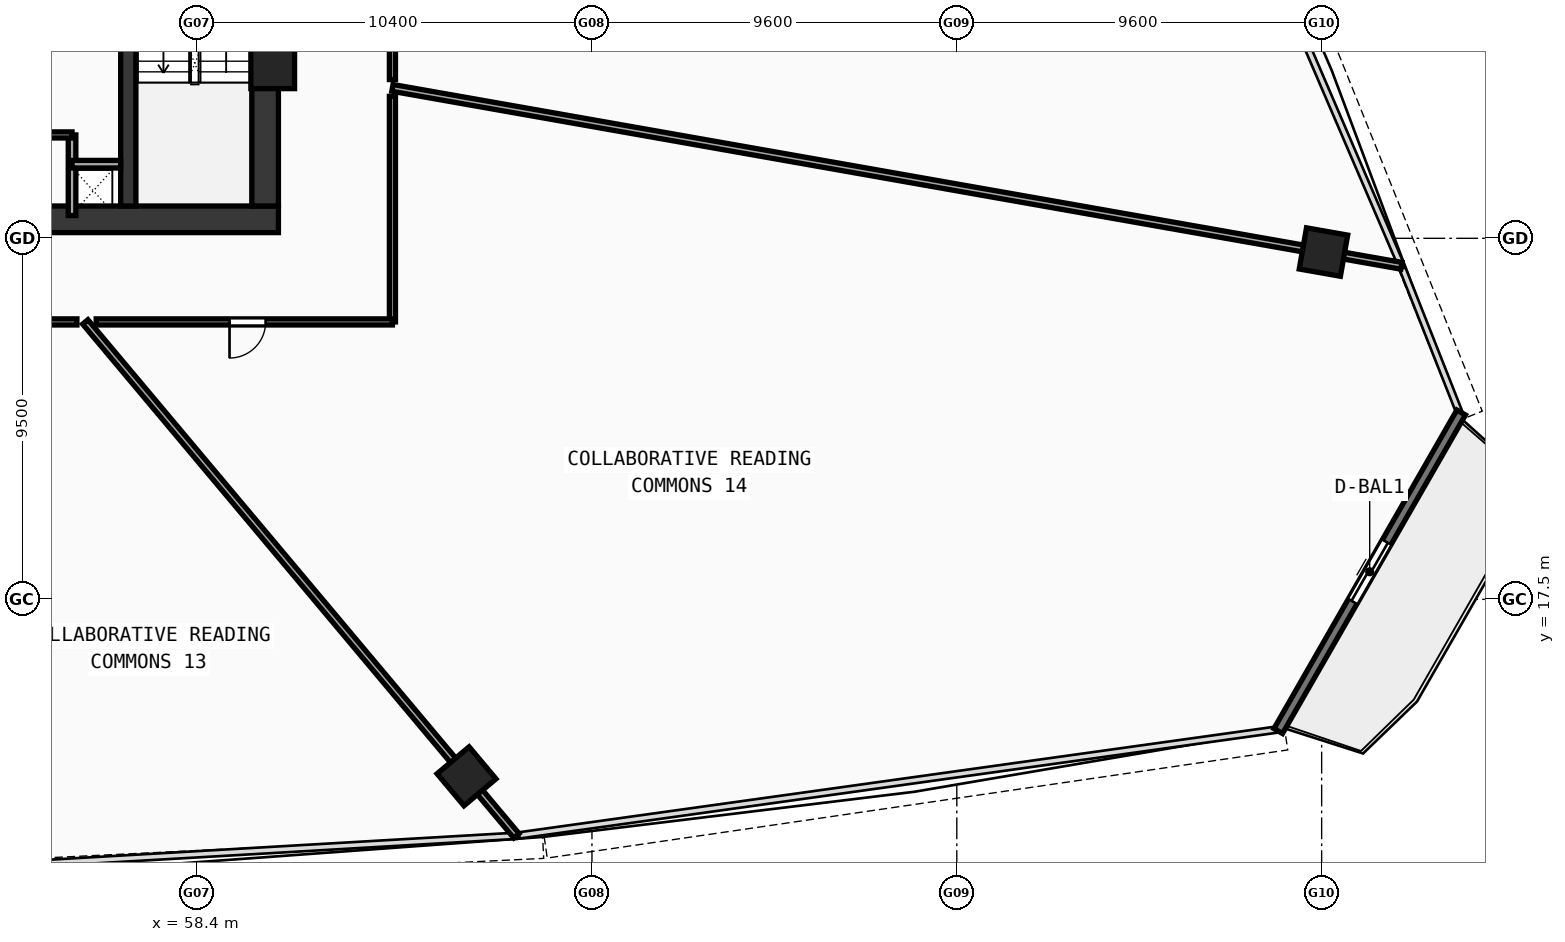
"""IFC4 building model, lengths in metres.
Left out: names, types, materials, properties, quantities, classifications, styles, units other than length and angle.
Written with IfcOpenShell. Run it as: python <this file> out.ifc"""

import sys

from ifc_helpers import new_model, si_unit, direction, frame, frame_2d, origin, origin_with_axes, origin_2d, place, context, subcontext, project, spatial, rectangle, hollow_rectangle, extrude, source, transform, mapped, element, fill, save


model = new_model("IFC4")
c1 = context("Model", 3, precision=1e-05, world=origin(), true_north=direction((0.0, 1.0)))
c2 = subcontext(c1, "Body", "Model", "MODEL_VIEW")
j1 = project(units=[si_unit("LENGTHUNIT", "METRE"), si_unit("PLANEANGLEUNIT", "RADIAN")], contexts=[c1])
p1 = place(None, origin())
s1 = spatial("IfcSite", under=j1, at=p1, CompositionType="ELEMENT")
p2 = place(p1, origin())
s2 = spatial("IfcBuilding", under=s1, at=p2, CompositionType="ELEMENT")
p3 = place(p2, frame((0.0, 0.0, 30.4)))
s3 = spatial("IfcBuildingStorey", under=s2, at=p3, CompositionType="ELEMENT", Elevation=30.4)
p4 = place(p3, frame((35.45, 27.5, 0.0), z_axis=(0.0, 0.0, 1.0), x_axis=(1.0, 0.0, 0.0)))
e1 = element("IfcWall", 1, at=p4, inside=s3, PredefinedType="SHEAR", context=c2, shape_type="SweptSolid", body=[
    extrude(rectangle(XDim=25.1, YDim=0.7, at=frame_2d((12.55, 0.0))), origin(), (0.0, 0.0, 1.0), 3.37),
])
p5 = place(p3, frame((60.2, 27.85, 0.0), z_axis=(0.0, 0.0, 1.0), x_axis=(0.0, 1.0, 0.0)))
e2 = element("IfcWall", 2, at=p5, inside=s3, PredefinedType="SHEAR", context=c2, shape_type="SweptSolid", body=[
    extrude(rectangle(XDim=12.0, YDim=0.7, at=frame_2d((6.0, 0.0))), origin(), (0.0, 0.0, 1.0), 3.37),
])
p6 = place(p3, frame((56.6, 27.85, 0.0), z_axis=(0.0, 0.0, 1.0), x_axis=(0.0, 1.0, 0.0)))
e3 = element("IfcWall", 3, at=p6, inside=s3, PredefinedType="SHEAR", context=c2, shape_type="SweptSolid", body=[
    extrude(rectangle(XDim=12.0, YDim=0.4, at=frame_2d((6.0, 0.0))), origin(), (0.0, 0.0, 1.0), 3.37),
])
p7 = place(p6, frame((9.9, 0.0, 0.0)))
e4 = element("IfcOpeningElement", 4, at=p7, cuts=e3, PredefinedType="OPENING", context=c2, shape_type="SweptSolid", body=[
    extrude(rectangle(XDim=1.1, YDim=2.1, at=frame_2d((0.55, 1.05))), frame((0.0, 0.21, 0.0), z_axis=(0.0, -1.0, 0.0), x_axis=(1.0, 0.0, 0.0)), (0.0, 0.0, 1.0), 0.42),
])
m1 = source(origin(), c2, "Body", "SweptSolid", [
    extrude(hollow_rectangle(XDim=1.15, YDim=1.15, WallThickness=0.048, at=origin_2d()), origin(), (0.0, 0.0, 1.0), 3.63),
])
p8 = place(p3, frame((60.4, 31.513, -0.26), z_axis=(0.0, 0.0, 1.0), x_axis=(1.0, 0.0, 0.0)))
e5 = element("IfcColumn", 5, at=p8, inside=s3, PredefinedType="COLUMN", context=c2, shape_type="MappedRepresentation", body=[
    mapped(m1, transform((0.0, 0.0, 0.0), scale=1.0)),
])
m2 = source(origin(), c2, "Body", "SweptSolid", [
    extrude(hollow_rectangle(XDim=1.1, YDim=1.1, WallThickness=0.045, at=origin_2d()), origin(), (0.0, 0.0, 1.0), 3.63),
])
for number, where, z_axis, x_axis in (
    (6, (65.5, 12.844, -0.26), (0.0, 0.0, 1.0), (0.766, 0.643, 0.0)),
    (7, (88.048, 26.638, -0.26), (0.0, 0.0, 1.0), (0.174, 0.985, 0.0)),
):
    element("IfcColumn", number, at=place(p3, frame(where, z_axis=z_axis, x_axis=x_axis)), inside=s3, PredefinedType="COLUMN", context=c2, shape_type="MappedRepresentation", body=[
        mapped(m2, transform((0.0, 0.0, 0.0), scale=1.0)),
    ])
p9 = place(p3, frame((86.858, 14.035, 0.0), z_axis=(0.0, 0.0, 1.0), x_axis=(0.497938580997, 0.867212297857, 0.0)))
e8 = element("IfcWall", 8, at=p9, inside=s3, PredefinedType="STANDARD", context=c2, shape_type="SweptSolid", body=[
    extrude(rectangle(XDim=9.666, YDim=0.26, at=frame_2d((4.833, 0.0))), origin(), (0.0, 0.0, 1.0), 3.37),
])
p10 = place(p9, frame((3.933, 0.0, 0.0)))
e9 = element("IfcOpeningElement", 9, at=p10, cuts=e8, PredefinedType="OPENING", context=c2, shape_type="SweptSolid", body=[
    extrude(rectangle(XDim=1.8, YDim=2.15, at=frame_2d((0.9, 1.075))), frame((0.0, 0.14, 0.0), z_axis=(0.0, -1.0, 0.0), x_axis=(1.0, 0.0, 0.0)), (0.0, 0.0, 1.0), 0.28),
])
p11 = place(p3, frame((55.12, 27.6, 0.0), z_axis=(0.0, 0.0, 1.0), x_axis=(0.0, 1.0, 0.0)))
e10 = element("IfcWall", 10, at=p11, inside=s3, PredefinedType="SOLIDWALL", context=c2, shape_type="SweptSolid", body=[
    extrude(rectangle(XDim=2.12, YDim=0.2, at=frame_2d((1.06, 0.0))), origin(), (0.0, 0.0, 1.0), 3.37),
])
p12 = place(p3, frame((55.12, 28.95, 0.0), z_axis=(0.0, 0.0, 1.0), x_axis=(1.0, 0.0, 0.0)))
e11 = element("IfcWall", 11, at=p12, inside=s3, PredefinedType="SOLIDWALL", context=c2, shape_type="SweptSolid", body=[
    extrude(rectangle(XDim=1.28, YDim=0.2, at=frame_2d((0.64, 0.0))), origin(), (0.0, 0.0, 1.0), 3.37),
])
p13 = place(p3, frame((51.05, 29.72, 0.0), z_axis=(0.0, 0.0, 1.0), x_axis=(1.0, 0.0, 0.0)))
e12 = element("IfcWall", 12, at=p13, inside=s3, PredefinedType="PARTITIONING", context=c2, shape_type="SweptSolid", body=[
    extrude(rectangle(XDim=4.07, YDim=0.16, at=frame_2d((2.035, 0.0))), origin(), (0.0, 0.0, 1.0), 3.37),
])
p14 = place(p13, frame((0.5, 0.0, 0.0)))
e13 = element("IfcOpeningElement", 13, at=p14, cuts=e12, PredefinedType="OPENING", context=c2, shape_type="SweptSolid", body=[
    extrude(rectangle(XDim=0.9, YDim=2.1, at=frame_2d((0.45, 1.05))), frame((0.0, 0.09, 0.0), z_axis=(0.0, -1.0, 0.0), x_axis=(1.0, 0.0, 0.0)), (0.0, 0.0, 1.0), 0.18),
])
p15 = place(p3, frame((55.468, 24.8, 0.0), z_axis=(0.0, 0.0, 1.0), x_axis=(0.642784869497, -0.766046742403, 0.0)))
e14 = element("IfcWall", 14, at=p15, inside=s3, PredefinedType="PARTITIONING", context=c2, shape_type="SweptSolid", body=[
    extrude(rectangle(XDim=17.65, YDim=0.18, at=frame_2d((8.825, 0.0))), origin(), (0.0, 0.0, 1.0), 2.67),
])
p16 = place(p3, frame((63.55, 30.958, 0.0), z_axis=(0.0, 0.0, 1.0), x_axis=(0.984807983054, -0.17364687303, 0.0)))
e15 = element("IfcWall", 15, at=p16, inside=s3, PredefinedType="PARTITIONING", context=c2, shape_type="SweptSolid", body=[
    extrude(rectangle(XDim=26.958, YDim=0.18, at=frame_2d((13.479, 0.0))), origin(), (0.0, 0.0, 1.0), 2.67),
])
p17 = place(p3, frame((63.55, 41.064, 0.0), z_axis=(0.0, 0.0, 1.0), x_axis=(0.0, -1.0, 0.0)))
e16 = element("IfcWall", 16, at=p17, inside=s3, PredefinedType="PARTITIONING", context=c2, shape_type="SweptSolid", body=[
    extrude(rectangle(XDim=9.886, YDim=0.16, at=frame_2d((4.943, 0.0))), origin(), (0.0, 0.0, 1.0), 2.67),
])
p18 = place(p17, frame((4.468, 0.0, 0.0)))
e17 = element("IfcOpeningElement", 17, at=p18, cuts=e16, PredefinedType="OPENING", context=c2, shape_type="SweptSolid", body=[
    extrude(rectangle(XDim=0.95, YDim=2.1, at=frame_2d((0.475, 1.05))), frame((0.0, 0.09, 0.0), z_axis=(0.0, -1.0, 0.0), x_axis=(1.0, 0.0, 0.0)), (0.0, 0.0, 1.0), 0.18),
])
p19 = place(p3, frame((63.55, 30.735, 0.0), z_axis=(0.0, 0.0, 1.0), x_axis=(0.0, -1.0, 0.0)))
e18 = element("IfcWall", 18, at=p19, inside=s3, PredefinedType="PARTITIONING", context=c2, shape_type="SweptSolid", body=[
    extrude(rectangle(XDim=5.935, YDim=0.16, at=frame_2d((2.967, 0.0))), origin(), (0.0, 0.0, 1.0), 2.97),
])
p20 = place(p3, frame((63.55, 24.8, 0.0), z_axis=(0.0, 0.0, 1.0), x_axis=(-1.0, 0.0, 0.0)))
e19 = element("IfcWall", 19, at=p20, inside=s3, PredefinedType="PARTITIONING", context=c2, shape_type="SweptSolid", body=[
    extrude(rectangle(XDim=7.795, YDim=0.16, at=frame_2d((3.897, 0.0))), origin(), (0.0, 0.0, 1.0), 2.97),
])
p21 = place(p20, frame((3.336, 0.0, 0.0)))
e20 = element("IfcOpeningElement", 20, at=p21, cuts=e19, PredefinedType="OPENING", context=c2, shape_type="SweptSolid", body=[
    extrude(rectangle(XDim=0.95, YDim=2.1, at=frame_2d((0.475, 1.05))), frame((0.0, 0.09, 0.0), z_axis=(0.0, -1.0, 0.0), x_axis=(1.0, 0.0, 0.0)), (0.0, 0.0, 1.0), 0.18),
])
p22 = place(p3, frame((55.248, 24.8, 0.0), z_axis=(0.0, 0.0, 1.0), x_axis=(-1.0, 0.0, 0.0)))
e21 = element("IfcWall", 21, at=p22, inside=s3, PredefinedType="PARTITIONING", context=c2, shape_type="SweptSolid", body=[
    extrude(rectangle(XDim=4.635, YDim=0.16, at=frame_2d((2.318, 0.0))), origin(), (0.0, 0.0, 1.0), 2.67),
])
p23 = place(p22, frame((1.847, 0.0, 0.0)))
e22 = element("IfcOpeningElement", 22, at=p23, cuts=e21, PredefinedType="OPENING", context=c2, shape_type="SweptSolid", body=[
    extrude(rectangle(XDim=0.95, YDim=2.1, at=frame_2d((0.475, 1.05))), frame((0.0, 0.09, 0.0), z_axis=(0.0, -1.0, 0.0), x_axis=(1.0, 0.0, 0.0)), (0.0, 0.0, 1.0), 0.18),
])
m3 = source(origin(), c2, "Body", "SweptSolid", [
    extrude(rectangle(XDim=1.8, YDim=2.15, at=frame_2d((0.9, 1.075))), frame((0.0, 0.025, 0.0), z_axis=(0.0, -1.0, 0.0), x_axis=(1.0, 0.0, 0.0)), (0.0, 0.0, 1.0), 0.05),
])
p24 = place(p10, origin_with_axes())
e23 = element("IfcDoor", 23, at=p24, inside=s3, OperationType="DOUBLE_DOOR_SLIDING", PredefinedType="DOOR", context=c2, shape_type="MappedRepresentation", body=[
    mapped(m3, transform((0.0, 0.0, 0.0), scale=1.0)),
])
fill(e9, e23)
m4 = source(origin(), c2, "Body", "SweptSolid", [
    extrude(rectangle(XDim=0.95, YDim=2.1, at=frame_2d((0.475, 1.05))), frame((0.0, 0.025, 0.0), z_axis=(0.0, -1.0, 0.0), x_axis=(1.0, 0.0, 0.0)), (0.0, 0.0, 1.0), 0.05),
])
p25 = place(p21, origin_with_axes())
e24 = element("IfcDoor", 24, at=p25, inside=s3, OperationType="SINGLE_SWING_RIGHT", PredefinedType="DOOR", context=c2, shape_type="MappedRepresentation", body=[
    mapped(m4, transform((0.0, 0.0, 0.0), scale=1.0)),
])
fill(e20, e24)
save(model, sys.argv[1])
